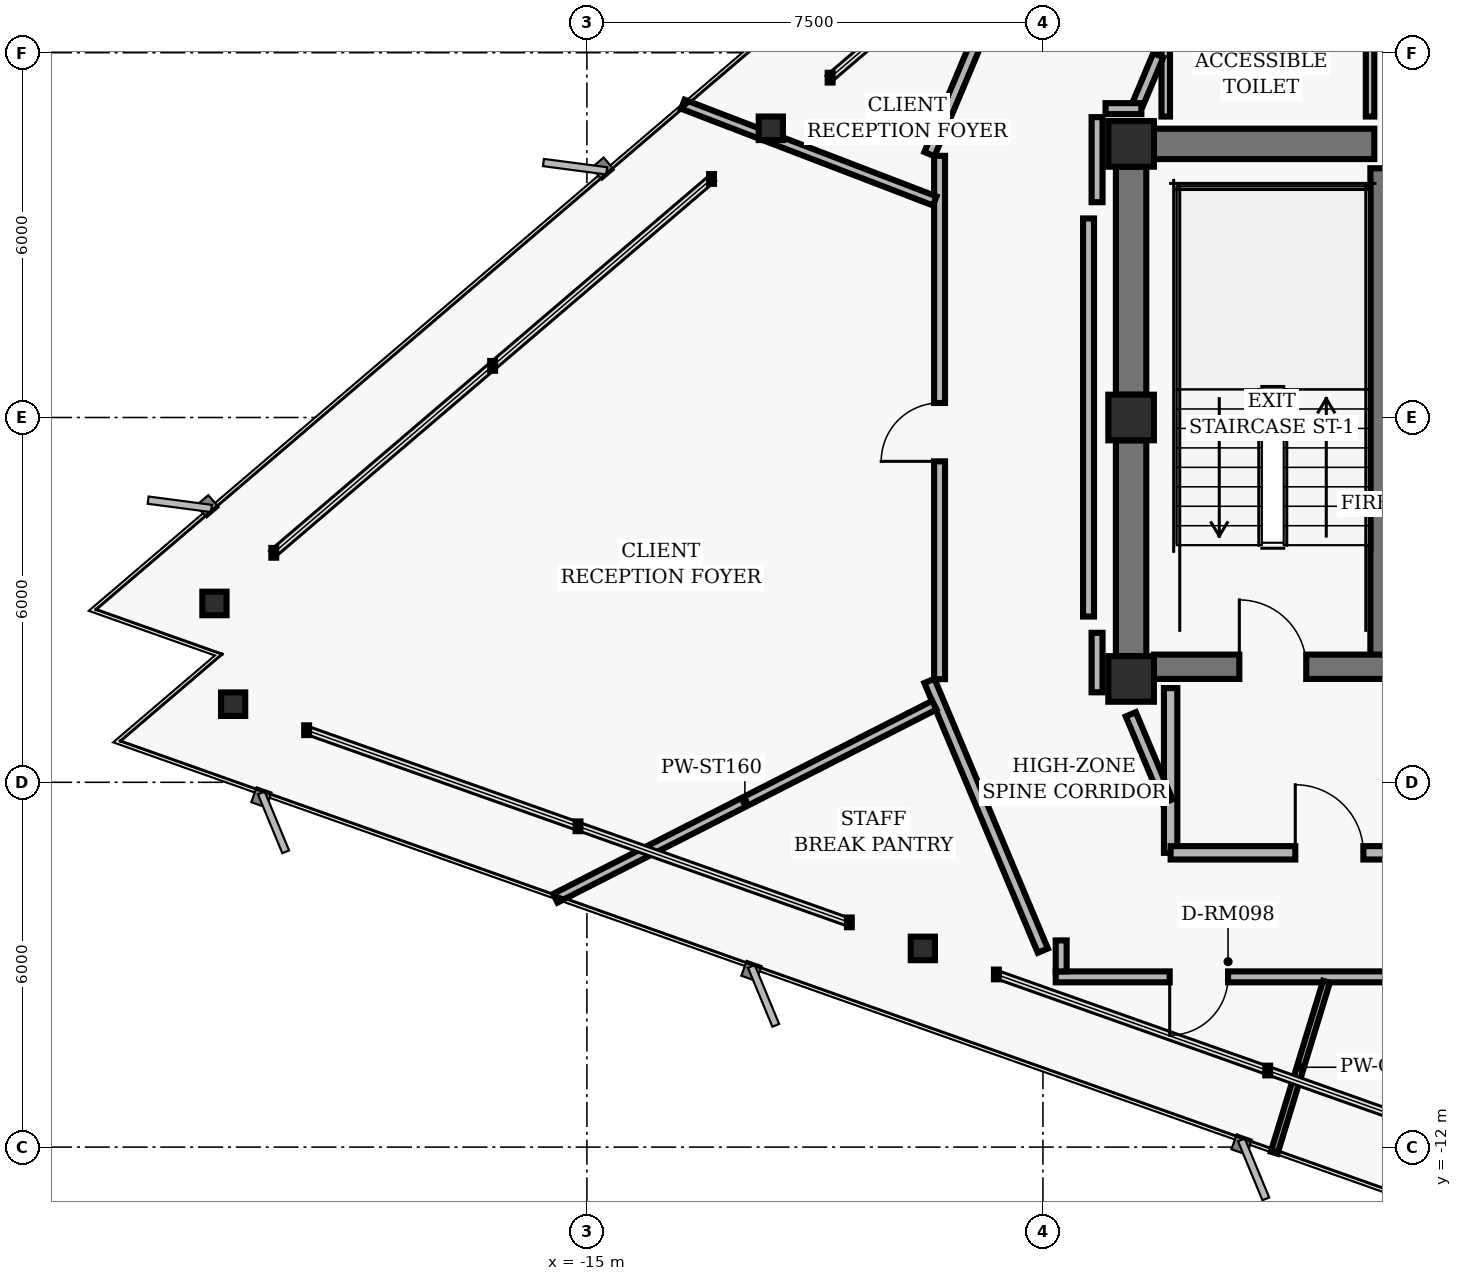
"""IFC4 building model, lengths in metres.
Left out: names, types, materials, properties, quantities, classifications, styles, units other than length and angle.
Written with IfcOpenShell. Run it as: python <this file> out.ifc"""

import sys

from ifc_helpers import new_model, si_unit, direction, frame, frame_2d, origin, origin_2d, place, context, subcontext, project, spatial, rectangle, hollow_rectangle, i_section, extrude, element, fill, save


model = new_model("IFC4")
c1 = context("Model", 3, precision=1e-05, world=origin(), true_north=direction((0.0, 1.0)))
c2 = subcontext(c1, "Body", "Model", "MODEL_VIEW")
j1 = project(units=[si_unit("LENGTHUNIT", "METRE"), si_unit("PLANEANGLEUNIT", "RADIAN")], contexts=[c1])
p1 = place(None, origin())
s1 = spatial("IfcSite", under=j1, at=p1, CompositionType="ELEMENT")
p2 = place(p1, origin())
s2 = spatial("IfcBuilding", under=s1, at=p2, CompositionType="ELEMENT")
p3 = place(p2, frame((0.0, 0.0, 178.4)))
s3 = spatial("IfcBuildingStorey", under=s2, at=p3, CompositionType="ELEMENT", Elevation=178.4)
for number, where, z_axis, x_axis in (
    (1, (-6.05, 4.5, 0.0), (0.0, 0.0, 1.0), (1.0, 0.0, 0.0)),
    (2, (-6.05, 0.0, 0.0), (0.0, 0.0, 1.0), (1.0, 0.0, 0.0)),
    (3, (-6.05, -4.3, 0.0), (0.0, 0.0, 1.0), (1.0, 0.0, 0.0)),
):
    element("IfcColumn", number, at=place(p3, frame(where, z_axis=z_axis, x_axis=x_axis)), inside=s3, PredefinedType="COLUMN", context=c2, shape_type="SweptSolid", body=[
        extrude(hollow_rectangle(XDim=0.75, YDim=0.75, WallThickness=0.05, InnerFilletRadius=0.02, OuterFilletRadius=0.04, at=origin_2d()), origin(), (0.0, 0.0, 1.0), 3.04),
    ])
p4 = place(p3, frame((-6.05, 0.375, 0.0), z_axis=(0.0, 0.0, 1.0), x_axis=(0.0, 1.0, 0.0)))
e4 = element("IfcWall", 4, at=p4, inside=s3, PredefinedType="SHEAR", context=c2, shape_type="SweptSolid", body=[
    extrude(rectangle(XDim=3.75, YDim=0.5, at=frame_2d((1.875, 0.0))), origin(), (0.0, 0.0, 1.0), 2.798),
])
p5 = place(p3, frame((-6.05, -3.925, 0.0), z_axis=(0.0, 0.0, 1.0), x_axis=(0.0, 1.0, 0.0)))
e5 = element("IfcWall", 5, at=p5, inside=s3, PredefinedType="SHEAR", context=c2, shape_type="SweptSolid", body=[
    extrude(rectangle(XDim=3.55, YDim=0.5, at=frame_2d((1.775, 0.0))), origin(), (0.0, 0.0, 1.0), 2.798),
])
p6 = place(p3, frame((-1.94, -4.1, 0.0), z_axis=(0.0, 0.0, 1.0), x_axis=(0.0, 1.0, 0.0)))
e6 = element("IfcWall", 6, at=p6, inside=s3, PredefinedType="SHEAR", context=c2, shape_type="SweptSolid", body=[
    extrude(rectangle(XDim=8.2, YDim=0.35, at=frame_2d((4.1, 0.0))), origin(), (0.0, 0.0, 1.0), 2.798),
])
p7 = place(p3, frame((-5.675, -4.1, 0.0), z_axis=(0.0, 0.0, 1.0), x_axis=(1.0, 0.0, 0.0)))
e7 = element("IfcWall", 7, at=p7, inside=s3, PredefinedType="SHEAR", context=c2, shape_type="SweptSolid", body=[
    extrude(rectangle(XDim=11.35, YDim=0.4, at=frame_2d((5.675, 0.0))), origin(), (0.0, 0.0, 1.0), 2.798),
])
p8 = place(p7, frame((1.405, 0.0, 0.0)))
e8 = element("IfcOpeningElement", 8, at=p8, cuts=e7, PredefinedType="OPENING", context=c2, shape_type="SweptSolid", body=[
    extrude(rectangle(XDim=1.1, YDim=2.04, at=frame_2d((0.55, 1.02))), frame((0.0, 0.21, 0.0), z_axis=(0.0, -1.0, 0.0), x_axis=(1.0, 0.0, 0.0)), (0.0, 0.0, 1.0), 0.42),
])
p9 = place(p7, frame((8.845, 0.0, 0.0)))
e9 = element("IfcOpeningElement", 9, at=p9, cuts=e7, PredefinedType="OPENING", context=c2, shape_type="SweptSolid", body=[
    extrude(rectangle(XDim=1.1, YDim=2.04, at=frame_2d((0.55, 1.02))), frame((0.0, 0.21, 0.0), z_axis=(0.0, -1.0, 0.0), x_axis=(1.0, 0.0, 0.0)), (0.0, 0.0, 1.0), 0.42),
])
p10 = place(p7, frame((4.145, 0.0, 0.0)))
e10 = element("IfcOpeningElement", 10, at=p10, cuts=e7, PredefinedType="OPENING", context=c2, shape_type="SweptSolid", body=[
    extrude(rectangle(XDim=1.06, YDim=2.04, at=frame_2d((0.53, 1.02))), frame((0.0, 0.21, 0.0), z_axis=(0.0, -1.0, 0.0), x_axis=(1.0, 0.0, 0.0)), (0.0, 0.0, 1.0), 0.42),
])
p11 = place(p7, frame((6.145, 0.0, 0.0)))
e11 = element("IfcOpeningElement", 11, at=p11, cuts=e7, PredefinedType="OPENING", context=c2, shape_type="SweptSolid", body=[
    extrude(rectangle(XDim=1.06, YDim=2.04, at=frame_2d((0.53, 1.02))), frame((0.0, 0.21, 0.0), z_axis=(0.0, -1.0, 0.0), x_axis=(1.0, 0.0, 0.0)), (0.0, 0.0, 1.0), 0.42),
])
p12 = place(p3, frame((-5.675, 4.5, 0.0), z_axis=(0.0, 0.0, 1.0), x_axis=(1.0, 0.0, 0.0)))
e12 = element("IfcWall", 12, at=p12, inside=s3, PredefinedType="SHEAR", context=c2, shape_type="SweptSolid", body=[
    extrude(rectangle(XDim=3.625, YDim=0.5, at=frame_2d((1.812, 0.0))), origin(), (0.0, 0.0, 1.0), 2.798),
])
for number, where, z_axis, x_axis in (
    (13, (-11.975, 4.757, 0.0), (0.0, 0.0, 1.0), (1.0, 0.0, 0.0)),
    (14, (-21.125, -3.059, 0.0), (0.0, 0.0, 1.0), (1.0, 0.0, 0.0)),
    (15, (-20.818, -4.715, 0.0), (0.0, 0.0, 1.0), (1.0, 0.0, 0.0)),
    (16, (-9.475, -8.732, 0.0), (0.0, 0.0, 1.0), (1.0, 0.0, 0.0)),
):
    element("IfcColumn", number, at=place(p3, frame(where, z_axis=z_axis, x_axis=x_axis)), inside=s3, PredefinedType="COLUMN", context=c2, shape_type="SweptSolid", body=[
        extrude(i_section(OverallWidth=0.398, OverallDepth=0.387, WebThickness=0.021, FlangeThickness=0.033, FilletRadius=0.018, at=origin_2d()), origin(), (0.0, 0.0, 1.0), 3.04),
    ])
p13 = place(p3, frame((-5.4, -7.16, 0.0), z_axis=(0.0, 0.0, 1.0), x_axis=(0.0, 1.0, 0.0)))
e17 = element("IfcWall", 17, at=p13, inside=s3, PredefinedType="PARTITIONING", context=c2, shape_type="SweptSolid", body=[
    extrude(rectangle(XDim=2.71, YDim=0.22, at=frame_2d((1.355, 0.0))), origin(), (0.0, 0.0, 1.0), 2.773),
])
p14 = place(p3, frame((-5.4, -7.16, 0.0), z_axis=(0.0, 0.0, 1.0), x_axis=(1.0, 0.0, 0.0)))
e18 = element("IfcWall", 18, at=p14, inside=s3, PredefinedType="PARTITIONING", context=c2, shape_type="SweptSolid", body=[
    extrude(rectangle(XDim=5.4, YDim=0.22, at=frame_2d((2.7, 0.0))), origin(), (0.0, 0.0, 1.0), 2.395),
])
p15 = place(p14, frame((2.05, 0.0, 0.0)))
e19 = element("IfcOpeningElement", 19, at=p15, cuts=e18, PredefinedType="OPENING", context=c2, shape_type="SweptSolid", body=[
    extrude(rectangle(XDim=1.12, YDim=2.02, at=frame_2d((0.56, 1.01))), frame((0.0, 0.12, 0.0), z_axis=(0.0, -1.0, 0.0), x_axis=(1.0, 0.0, 0.0)), (0.0, 0.0, 1.0), 0.24),
])
for number, where, z_axis, x_axis in (
    (20, (-5.48, 4.95, 0.0), (0.0, 0.0, 1.0), (0.0, 1.0, 0.0)),
    (21, (-2.12, 4.95, 0.0), (0.0, 0.0, 1.0), (0.0, 1.0, 0.0)),
):
    element("IfcWall", number, at=place(p3, frame(where, z_axis=z_axis, x_axis=x_axis)), inside=s3, PredefinedType="PARTITIONING", context=c2, shape_type="SweptSolid", body=[
        extrude(rectangle(XDim=2.1, YDim=0.14, at=frame_2d((1.05, 0.0))), origin(), (0.0, 0.0, 1.0), 2.773),
    ])
p16 = place(p3, frame((-7.501, -8.769, 0.0), z_axis=(0.0, 0.0, 1.0), x_axis=(-0.387573945081, 0.921838617706, 0.0)))
e22 = element("IfcWall", 22, at=p16, inside=s3, PredefinedType="PARTITIONING", context=c2, shape_type="SweptSolid", body=[
    extrude(rectangle(XDim=4.813, YDim=0.18, at=frame_2d((2.407, 0.0))), origin(), (0.0, 0.0, 1.0), 2.773),
])
p17 = place(p3, frame((-9.2, -4.303, 0.0), z_axis=(0.0, 0.0, 1.0), x_axis=(0.0, 1.0, 0.0)))
e23 = element("IfcWall", 23, at=p17, inside=s3, PredefinedType="PARTITIONING", context=c2, shape_type="SweptSolid", body=[
    extrude(rectangle(XDim=8.607, YDim=0.18, at=frame_2d((4.303, 0.0))), origin(), (0.0, 0.0, 1.0), 2.773),
])
p18 = place(p17, frame((3.582, 0.0, 0.0)))
e24 = element("IfcOpeningElement", 24, at=p18, cuts=e23, PredefinedType="OPENING", context=c2, shape_type="SweptSolid", body=[
    extrude(rectangle(XDim=0.96, YDim=2.02, at=frame_2d((0.48, 1.01))), frame((0.0, 0.1, 0.0), z_axis=(0.0, -1.0, 0.0), x_axis=(1.0, 0.0, 0.0)), (0.0, 0.0, 1.0), 0.2),
])
p19 = place(p3, frame((-9.367, 4.332, 0.0), z_axis=(0.0, 0.0, 1.0), x_axis=(0.387573945081, 0.921838617706, 0.0)))
e25 = element("IfcWall", 25, at=p19, inside=s3, PredefinedType="PARTITIONING", context=c2, shape_type="SweptSolid", body=[
    extrude(rectangle(XDim=4.813, YDim=0.18, at=frame_2d((2.407, 0.0))), origin(), (0.0, 0.0, 1.0), 2.395),
])
p20 = place(p19, frame((1.927, 0.0, 0.0)))
e26 = element("IfcOpeningElement", 26, at=p20, cuts=e25, PredefinedType="OPENING", context=c2, shape_type="SweptSolid", body=[
    extrude(rectangle(XDim=0.96, YDim=2.02, at=frame_2d((0.48, 1.01))), frame((0.0, 0.1, 0.0), z_axis=(0.0, -1.0, 0.0), x_axis=(1.0, 0.0, 0.0)), (0.0, 0.0, 1.0), 0.2),
])
p21 = place(p3, frame((-5.602, 5.958, 0.0), z_axis=(0.0, 0.0, 1.0), x_axis=(-0.387588639363, -0.921832439566, 0.0)))
e27 = element("IfcWall", 27, at=p21, inside=s3, PredefinedType="PARTITIONING", context=c2, shape_type="SweptSolid", body=[
    extrude(rectangle(XDim=0.862, YDim=0.18, at=frame_2d((0.431, 0.0))), origin(), (0.0, 0.0, 1.0), 2.773),
])
p22 = place(p3, frame((-5.881, 5.08, 0.0), z_axis=(0.0, 0.0, 1.0), x_axis=(-1.0, 0.0, 0.0)))
e28 = element("IfcWall", 28, at=p22, inside=s3, PredefinedType="PARTITIONING", context=c2, shape_type="SweptSolid", body=[
    extrude(rectangle(XDim=0.589, YDim=0.18, at=frame_2d((0.294, 0.0))), origin(), (0.0, 0.0, 1.0), 2.773),
])
p23 = place(p3, frame((-6.61, 4.94, 0.0), z_axis=(0.0, 0.0, 1.0), x_axis=(0.0, -1.0, 0.0)))
e29 = element("IfcWall", 29, at=p23, inside=s3, PredefinedType="PARTITIONING", context=c2, shape_type="SweptSolid", body=[
    extrude(rectangle(XDim=1.399, YDim=0.18, at=frame_2d((0.699, 0.0))), origin(), (0.0, 0.0, 1.0), 2.773),
])
p24 = place(p3, frame((-6.75, 3.273, 0.0), z_axis=(0.0, 0.0, 1.0), x_axis=(0.0, -1.0, 0.0)))
e30 = element("IfcWall", 30, at=p24, inside=s3, PredefinedType="PARTITIONING", context=c2, shape_type="SweptSolid", body=[
    extrude(rectangle(XDim=6.547, YDim=0.18, at=frame_2d((3.273, 0.0))), origin(), (0.0, 0.0, 1.0), 2.773),
])
p25 = place(p3, frame((-6.61, -3.541, 0.0), z_axis=(0.0, 0.0, 1.0), x_axis=(0.0, -1.0, 0.0)))
e31 = element("IfcWall", 31, at=p25, inside=s3, PredefinedType="PARTITIONING", context=c2, shape_type="SweptSolid", body=[
    extrude(rectangle(XDim=0.979, YDim=0.18, at=frame_2d((0.489, 0.0))), origin(), (0.0, 0.0, 1.0), 2.773),
])
p26 = place(p3, frame((-6.055, -4.882, 0.0), z_axis=(0.0, 0.0, 1.0), x_axis=(0.387579540458, -0.921836265189, 0.0)))
e32 = element("IfcWall", 32, at=p26, inside=s3, PredefinedType="PARTITIONING", context=c2, shape_type="SweptSolid", body=[
    extrude(rectangle(XDim=1.555, YDim=0.18, at=frame_2d((0.777, 0.0))), origin(), (0.0, 0.0, 1.0), 2.773),
])
p27 = place(p3, frame((6.01, -9.2, 0.0), z_axis=(0.0, 0.0, 1.0), x_axis=(-1.0, 0.0, 0.0)))
e33 = element("IfcWall", 33, at=p27, inside=s3, PredefinedType="PARTITIONING", context=c2, shape_type="SweptSolid", body=[
    extrude(rectangle(XDim=13.3, YDim=0.18, at=frame_2d((6.65, 0.0))), origin(), (0.0, 0.0, 1.0), 2.395),
])
p28 = place(p27, frame((10.465, 0.0, 0.0)))
e34 = element("IfcOpeningElement", 34, at=p28, cuts=e33, PredefinedType="OPENING", context=c2, shape_type="SweptSolid", body=[
    extrude(rectangle(XDim=0.96, YDim=2.02, at=frame_2d((0.48, 1.01))), frame((0.0, 0.1, 0.0), z_axis=(0.0, -1.0, 0.0), x_axis=(1.0, 0.0, 0.0)), (0.0, 0.0, 1.0), 0.2),
])
p29 = place(p27, frame((4.373, 0.0, 0.0)))
e35 = element("IfcOpeningElement", 35, at=p29, cuts=e33, PredefinedType="OPENING", context=c2, shape_type="SweptSolid", body=[
    extrude(rectangle(XDim=0.96, YDim=2.02, at=frame_2d((0.48, 1.01))), frame((0.0, 0.1, 0.0), z_axis=(0.0, -1.0, 0.0), x_axis=(1.0, 0.0, 0.0)), (0.0, 0.0, 1.0), 0.2),
])
p30 = place(p3, frame((-7.2, -9.11, 0.0), z_axis=(0.0, 0.0, 1.0), x_axis=(0.0, 1.0, 0.0)))
e36 = element("IfcWall", 36, at=p30, inside=s3, PredefinedType="PARTITIONING", context=c2, shape_type="SweptSolid", body=[
    extrude(rectangle(XDim=0.51, YDim=0.18, at=frame_2d((0.255, 0.0))), origin(), (0.0, 0.0, 1.0), 2.773),
])
p31 = place(p3, frame((-9.286, -4.731, 0.0), z_axis=(0.0, 0.0, 1.0), x_axis=(-0.891002207928, -0.453998970778, 0.0)))
e37 = element("IfcWall", 37, at=p31, inside=s3, PredefinedType="PARTITIONING", context=c2, shape_type="SweptSolid", body=[
    extrude(rectangle(XDim=6.996, YDim=0.16, at=frame_2d((3.498, 0.0))), origin(), (0.0, 0.0, 1.0), 2.773),
])
p32 = place(p3, frame((-2.837, -9.28, 0.0), z_axis=(0.0, 0.0, 1.0), x_axis=(-0.292353462598, -0.95631033295, 0.0)))
e38 = element("IfcWall", 38, at=p32, inside=s3, PredefinedType="MOVABLE", context=c2, shape_type="SweptSolid", body=[
    extrude(rectangle(XDim=2.942, YDim=0.115, at=frame_2d((1.471, 0.0))), origin(), (0.0, 0.0, 1.0), 2.773),
])
p33 = place(p3, frame((-9.28, 3.562, 0.0), z_axis=(0.0, 0.0, 1.0), x_axis=(-0.933582300371, 0.3583630679, 0.0)))
e39 = element("IfcWall", 39, at=p33, inside=s3, PredefinedType="PARTITIONING", context=c2, shape_type="SweptSolid", body=[
    extrude(rectangle(XDim=4.436, YDim=0.16, at=frame_2d((2.218, 0.0))), origin(), (0.0, 0.0, 1.0), 2.773),
])
p34 = place(p8, origin())
e40 = element("IfcDoor", 40, at=p34, inside=s3, OperationType="SINGLE_SWING_LEFT", PredefinedType="DOOR", context=c2, shape_type="SweptSolid", body=[
    extrude(rectangle(XDim=1.1, YDim=2.04, at=frame_2d((0.55, 1.02))), frame((0.0, 0.025, 0.0), z_axis=(0.0, -1.0, 0.0), x_axis=(1.0, 0.0, 0.0)), (0.0, 0.0, 1.0), 0.05),
])
fill(e8, e40)
p35 = place(p15, origin())
e41 = element("IfcDoor", 41, at=p35, inside=s3, OperationType="SINGLE_SWING_LEFT", PredefinedType="DOOR", context=c2, shape_type="SweptSolid", body=[
    extrude(rectangle(XDim=1.12, YDim=2.02, at=frame_2d((0.56, 1.01))), frame((0.0, 0.025, 0.0), z_axis=(0.0, -1.0, 0.0), x_axis=(1.0, 0.0, 0.0)), (0.0, 0.0, 1.0), 0.05),
])
fill(e19, e41)
p36 = place(p18, origin())
e42 = element("IfcDoor", 42, at=p36, inside=s3, OperationType="SINGLE_SWING_LEFT", PredefinedType="DOOR", context=c2, shape_type="SweptSolid", body=[
    extrude(rectangle(XDim=0.96, YDim=2.02, at=frame_2d((0.48, 1.01))), frame((0.0, 0.025, 0.0), z_axis=(0.0, -1.0, 0.0), x_axis=(1.0, 0.0, 0.0)), (0.0, 0.0, 1.0), 0.05),
])
fill(e24, e42)
p37 = place(p28, origin())
e43 = element("IfcDoor", 43, at=p37, inside=s3, OperationType="SINGLE_SWING_RIGHT", PredefinedType="DOOR", context=c2, shape_type="SweptSolid", body=[
    extrude(rectangle(XDim=0.96, YDim=2.02, at=frame_2d((0.48, 1.01))), frame((0.0, 0.025, 0.0), z_axis=(0.0, -1.0, 0.0), x_axis=(1.0, 0.0, 0.0)), (0.0, 0.0, 1.0), 0.05),
])
fill(e34, e43)
save(model, sys.argv[1])
